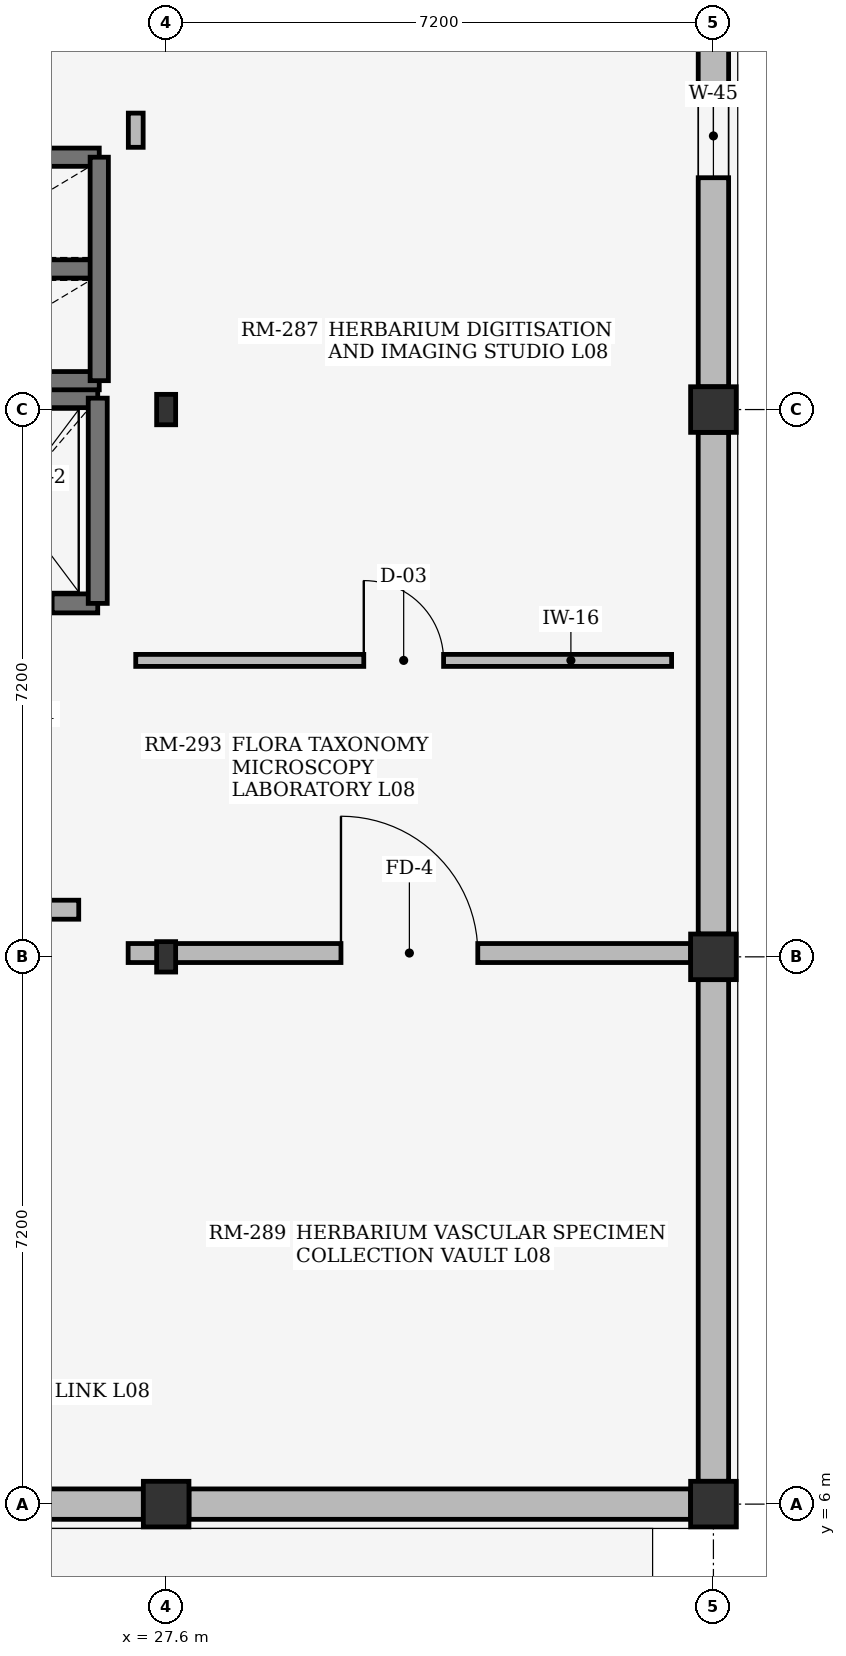
"""IFC4 building model, lengths in metres.
Left out: names, types, materials, properties, quantities, classifications, styles, units other than length and angle.
Written with IfcOpenShell. Run it as: python <this file> out.ifc"""

import sys

from ifc_helpers import new_model, si_unit, direction, frame, frame_2d, origin, origin_2d, place, context, subcontext, project, spatial, rectangle, i_section, extrude, element, fill, save


model = new_model("IFC4")
c1 = context("Model", 3, precision=1e-05, world=origin(), true_north=direction((0.0, 1.0)))
c2 = subcontext(c1, "Body", "Model", "MODEL_VIEW")
j1 = project(units=[si_unit("LENGTHUNIT", "METRE"), si_unit("PLANEANGLEUNIT", "RADIAN")], contexts=[c1])
p1 = place(None, origin())
s1 = spatial("IfcSite", under=j1, at=p1, CompositionType="ELEMENT")
p2 = place(p1, origin())
s2 = spatial("IfcBuilding", under=s1, at=p2, CompositionType="ELEMENT")
p3 = place(p2, frame((0.0, 0.0, 32.7)))
s3 = spatial("IfcBuildingStorey", under=s2, at=p3, CompositionType="ELEMENT", Elevation=32.7)
p4 = place(p3, frame((27.6, 6.0, 0.0), z_axis=(0.0, 0.0, 1.0), x_axis=(1.0, 0.0, 0.0)))
e1 = element("IfcColumn", 1, at=p4, inside=s3, PredefinedType="COLUMN", context=c2, shape_type="SweptSolid", body=[
    extrude(rectangle(XDim=0.6, YDim=0.6, at=origin_2d()), origin(), (0.0, 0.0, 1.0), 3.56),
])
for number, where, z_axis, x_axis in (
    (2, (27.6, 13.2, 0.0), (0.0, 0.0, 1.0), (1.0, 0.0, 0.0)),
    (3, (27.6, 20.4, 0.0), (0.0, 0.0, 1.0), (1.0, 0.0, 0.0)),
):
    element("IfcColumn", number, at=place(p3, frame(where, z_axis=z_axis, x_axis=x_axis)), inside=s3, PredefinedType="COLUMN", context=c2, shape_type="SweptSolid", body=[
        extrude(i_section(OverallWidth=0.25, OverallDepth=0.4, WebThickness=0.01, FlangeThickness=0.013, at=origin_2d()), origin(), (0.0, 0.0, 1.0), 3.56),
    ])
for number, where, z_axis, x_axis in (
    (4, (34.8, 6.0, 0.0), (0.0, 0.0, 1.0), (1.0, 0.0, 0.0)),
    (5, (34.8, 13.2, 0.0), (0.0, 0.0, 1.0), (1.0, 0.0, 0.0)),
    (6, (34.8, 20.4, 0.0), (0.0, 0.0, 1.0), (1.0, 0.0, 0.0)),
):
    element("IfcColumn", number, at=place(p3, frame(where, z_axis=z_axis, x_axis=x_axis)), inside=s3, PredefinedType="COLUMN", context=c2, shape_type="SweptSolid", body=[
        extrude(rectangle(XDim=0.6, YDim=0.6, at=origin_2d()), origin(), (0.0, 0.0, 1.0), 3.56),
    ])
for number, where, z_axis, x_axis in (
    (7, (20.7, 6.0, 0.0), (0.0, 0.0, 1.0), (1.0, 0.0, 0.0)),
    (8, (27.9, 6.0, 0.0), (0.0, 0.0, 1.0), (1.0, 0.0, 0.0)),
):
    element("IfcWall", number, at=place(p3, frame(where, z_axis=z_axis, x_axis=x_axis)), inside=s3, PredefinedType="STANDARD", context=c2, shape_type="SweptSolid", body=[
        extrude(rectangle(XDim=6.6, YDim=0.4, at=frame_2d((3.3, 0.0))), origin(), (0.0, 0.0, 1.0), 3.04),
    ])
p5 = place(p3, frame((34.8, 6.3, 0.0), z_axis=(0.0, 0.0, 1.0), x_axis=(0.0, 1.0, 0.0)))
e9 = element("IfcWall", 9, at=p5, inside=s3, PredefinedType="STANDARD", context=c2, shape_type="SweptSolid", body=[
    extrude(rectangle(XDim=6.6, YDim=0.4, at=frame_2d((3.3, 0.0))), origin(), (0.0, 0.0, 1.0), 3.04),
])
p6 = place(p3, frame((34.8, 13.5, 0.0), z_axis=(0.0, 0.0, 1.0), x_axis=(0.0, 1.0, 0.0)))
e10 = element("IfcWall", 10, at=p6, inside=s3, PredefinedType="STANDARD", context=c2, shape_type="SweptSolid", body=[
    extrude(rectangle(XDim=6.6, YDim=0.4, at=frame_2d((3.3, 0.0))), origin(), (0.0, 0.0, 1.0), 3.04),
])
p7 = place(p3, frame((34.8, 20.7, 0.0), z_axis=(0.0, 0.0, 1.0), x_axis=(0.0, 1.0, 0.0)))
e11 = element("IfcWall", 11, at=p7, inside=s3, PredefinedType="STANDARD", context=c2, shape_type="SweptSolid", body=[
    extrude(rectangle(XDim=6.6, YDim=0.4, at=frame_2d((3.3, 0.0))), origin(), (0.0, 0.0, 1.0), 3.04),
])
p8 = place(p7, frame((2.75, 0.0, 0.75)))
e12 = element("IfcOpeningElement", 12, at=p8, cuts=e11, PredefinedType="OPENING", context=c2, shape_type="SweptSolid", body=[
    extrude(rectangle(XDim=1.1, YDim=1.25, at=frame_2d((0.55, 0.625))), frame((0.0, 0.21, 0.0), z_axis=(0.0, -1.0, 0.0), x_axis=(1.0, 0.0, 0.0)), (0.0, 0.0, 1.0), 0.42),
])
p9 = place(p3, frame((24.4, 17.85, 0.0), z_axis=(0.0, 0.0, 1.0), x_axis=(1.0, 0.0, 0.0)))
e13 = element("IfcWall", 13, at=p9, inside=s3, PredefinedType="SHEAR", context=c2, shape_type="SweptSolid", body=[
    extrude(rectangle(XDim=2.3, YDim=0.25, at=frame_2d((1.15, 0.0))), origin(), (0.0, 0.0, 1.0), 3.56),
])
p10 = place(p9, frame((0.6, 0.0, 0.0)))
e14 = element("IfcOpeningElement", 14, at=p10, cuts=e13, PredefinedType="OPENING", context=c2, shape_type="SweptSolid", body=[
    extrude(rectangle(XDim=1.1, YDim=2.2, at=frame_2d((0.55, 1.1))), frame((0.0, 0.135, 0.0), z_axis=(0.0, -1.0, 0.0), x_axis=(1.0, 0.0, 0.0)), (0.0, 0.0, 1.0), 0.27),
])
p11 = place(p3, frame((24.4, 20.55, 0.0), z_axis=(0.0, 0.0, 1.0), x_axis=(1.0, 0.0, 0.0)))
e15 = element("IfcWall", 15, at=p11, inside=s3, PredefinedType="SHEAR", context=c2, shape_type="SweptSolid", body=[
    extrude(rectangle(XDim=2.3, YDim=0.25, at=frame_2d((1.15, 0.0))), origin(), (0.0, 0.0, 1.0), 3.56),
])
p12 = place(p3, frame((26.7, 17.85, 0.0), z_axis=(0.0, 0.0, 1.0), x_axis=(0.0, 1.0, 0.0)))
e16 = element("IfcWall", 16, at=p12, inside=s3, PredefinedType="SHEAR", context=c2, shape_type="SweptSolid", body=[
    extrude(rectangle(XDim=2.7, YDim=0.25, at=frame_2d((1.35, 0.0))), origin(), (0.0, 0.0, 1.0), 3.56),
])
for number, where, z_axis, x_axis in (
    (17, (24.48, 20.78, 0.0), (0.0, 0.0, 1.0), (1.0, 0.0, 0.0)),
    (18, (24.48, 22.25, 0.0), (0.0, 0.0, 1.0), (1.0, 0.0, 0.0)),
    (19, (24.48, 23.72, 0.0), (0.0, 0.0, 1.0), (1.0, 0.0, 0.0)),
):
    element("IfcWall", number, at=place(p3, frame(where, z_axis=z_axis, x_axis=x_axis)), inside=s3, PredefinedType="SHEAR", context=c2, shape_type="SweptSolid", body=[
        extrude(rectangle(XDim=2.24, YDim=0.24, at=frame_2d((1.12, 0.0))), origin(), (0.0, 0.0, 1.0), 3.56),
    ])
p13 = place(p3, frame((26.72, 20.78, 0.0), z_axis=(0.0, 0.0, 1.0), x_axis=(0.0, 1.0, 0.0)))
e20 = element("IfcWall", 20, at=p13, inside=s3, PredefinedType="SHEAR", context=c2, shape_type="SweptSolid", body=[
    extrude(rectangle(XDim=2.94, YDim=0.24, at=frame_2d((1.47, 0.0))), origin(), (0.0, 0.0, 1.0), 3.56),
])
p14 = place(p3, frame((24.45, 13.82, 0.0), z_axis=(0.0, 0.0, 1.0), x_axis=(1.0, 0.0, 0.0)))
e21 = element("IfcWall", 21, at=p14, inside=s3, PredefinedType="SOLIDWALL", context=c2, shape_type="SweptSolid", body=[
    extrude(rectangle(XDim=2.0, YDim=0.25, at=frame_2d((1.0, 0.0))), origin(), (0.0, 0.0, 1.0), 3.54),
])
p15 = place(p3, frame((27.2, 17.1, 0.0), z_axis=(0.0, 0.0, 1.0), x_axis=(1.0, 0.0, 0.0)))
e22 = element("IfcWall", 22, at=p15, inside=s3, PredefinedType="PARTITIONING", context=c2, shape_type="SweptSolid", body=[
    extrude(rectangle(XDim=7.05, YDim=0.158, at=frame_2d((3.525, 0.0))), origin(), (0.0, 0.0, 1.0), 3.54),
])
p16 = place(p15, frame((3.0, 0.0, 0.0)))
e23 = element("IfcOpeningElement", 23, at=p16, cuts=e22, PredefinedType="OPENING", context=c2, shape_type="SweptSolid", body=[
    extrude(rectangle(XDim=1.05, YDim=2.15, at=frame_2d((0.525, 1.075))), frame((0.0, 0.089, 0.0), z_axis=(0.0, -1.0, 0.0), x_axis=(1.0, 0.0, 0.0)), (0.0, 0.0, 1.0), 0.178),
])
p17 = place(p3, frame((27.1, 13.25, 0.0), z_axis=(0.0, 0.0, 1.0), x_axis=(1.0, 0.0, 0.0)))
e24 = element("IfcWall", 24, at=p17, inside=s3, PredefinedType="SOLIDWALL", context=c2, shape_type="SweptSolid", body=[
    extrude(rectangle(XDim=7.4, YDim=0.25, at=frame_2d((3.7, 0.0))), origin(), (0.0, 0.0, 1.0), 3.05),
])
p18 = place(p17, frame((2.8, 0.0, 0.0)))
e25 = element("IfcOpeningElement", 25, at=p18, cuts=e24, PredefinedType="OPENING", context=c2, shape_type="SweptSolid", body=[
    extrude(rectangle(XDim=1.8, YDim=2.25, at=frame_2d((0.9, 1.125))), frame((0.0, 0.135, 0.0), z_axis=(0.0, -1.0, 0.0), x_axis=(1.0, 0.0, 0.0)), (0.0, 0.0, 1.0), 0.27),
])
p19 = place(p3, frame((27.2, 24.3, 0.0), z_axis=(0.0, 0.0, 1.0), x_axis=(0.0, -1.0, 0.0)))
e26 = element("IfcWall", 26, at=p19, inside=s3, PredefinedType="PARTITIONING", context=c2, shape_type="SweptSolid", body=[
    extrude(rectangle(XDim=0.45, YDim=0.195, at=frame_2d((0.225, 0.0))), origin(), (0.0, 0.0, 1.0), 3.54),
])
p20 = place(p8, origin())
e27 = element("IfcWindow", 27, at=p20, inside=s3, PartitioningType="SINGLE_PANEL", PredefinedType="WINDOW", context=c2, shape_type="SweptSolid", body=[
    extrude(rectangle(XDim=1.1, YDim=1.25, at=frame_2d((0.55, 0.625))), frame((0.0, 0.03, 0.0), z_axis=(0.0, -1.0, 0.0), x_axis=(1.0, 0.0, 0.0)), (0.0, 0.0, 1.0), 0.06),
])
fill(e12, e27)
p21 = place(p16, origin())
e28 = element("IfcDoor", 28, at=p21, inside=s3, OperationType="SINGLE_SWING_LEFT", PredefinedType="DOOR", context=c2, shape_type="SweptSolid", body=[
    extrude(rectangle(XDim=1.05, YDim=2.15, at=frame_2d((0.525, 1.075))), frame((0.0, 0.025, 0.0), z_axis=(0.0, -1.0, 0.0), x_axis=(1.0, 0.0, 0.0)), (0.0, 0.0, 1.0), 0.05),
])
fill(e23, e28)
p22 = place(p18, origin())
e29 = element("IfcDoor", 29, at=p22, inside=s3, OperationType="DOUBLE_DOOR_SINGLE_SWING", PredefinedType="DOOR", context=c2, shape_type="SweptSolid", body=[
    extrude(rectangle(XDim=1.8, YDim=2.25, at=frame_2d((0.9, 1.125))), frame((0.0, 0.025, 0.0), z_axis=(0.0, -1.0, 0.0), x_axis=(1.0, 0.0, 0.0)), (0.0, 0.0, 1.0), 0.05),
])
fill(e25, e29)
save(model, sys.argv[1])
